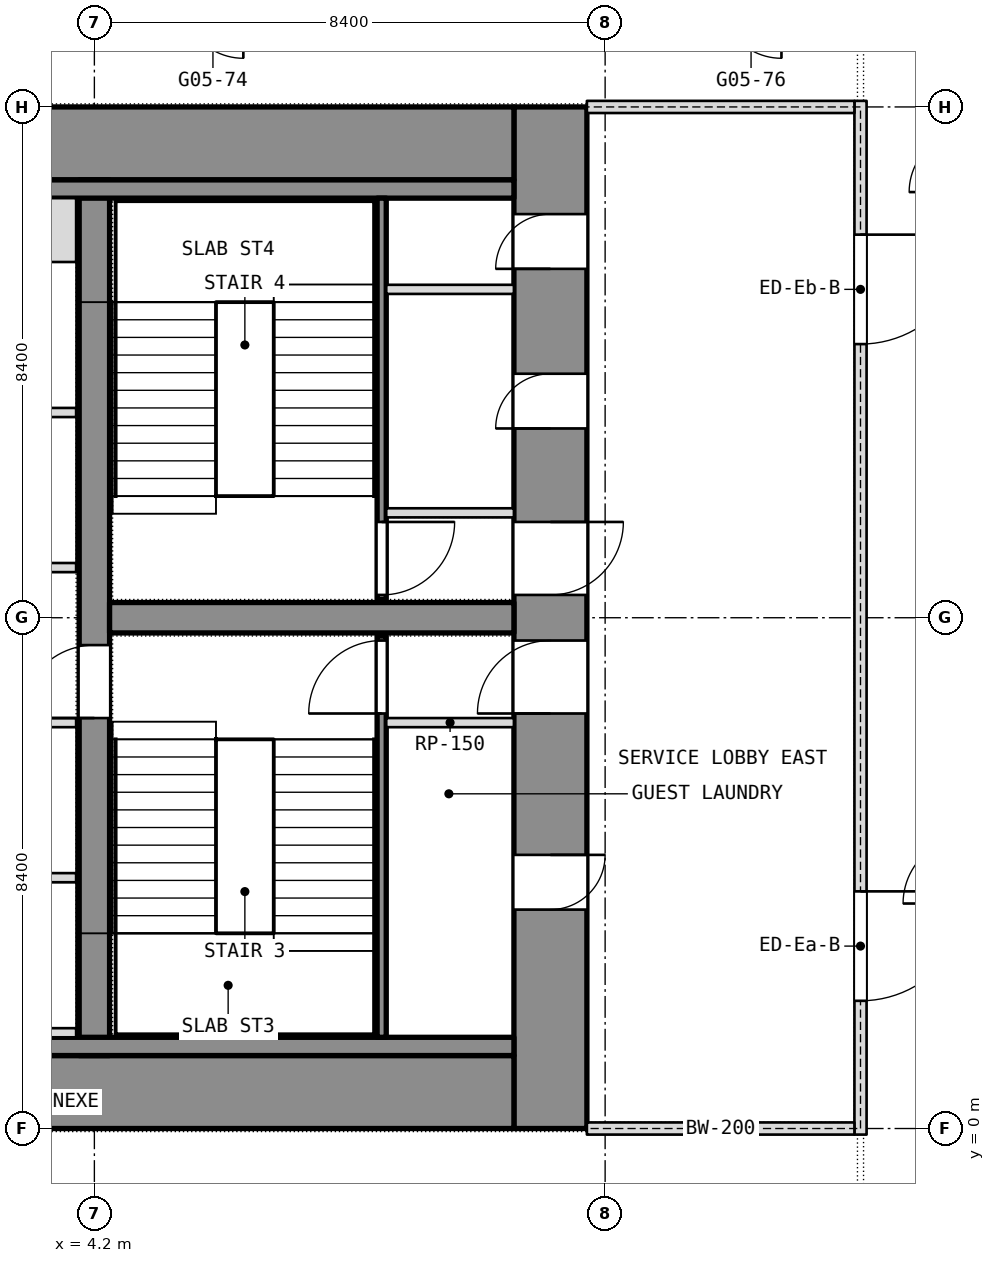
"""IFC4 building model, lengths in metres.
Left out: names, types, materials, properties, quantities, classifications, styles, units other than length and angle.
Written with IfcOpenShell. Run it as: python <this file> out.ifc"""

import sys

from ifc_helpers import new_model, si_unit, direction, frame, frame_2d, origin, place, context, subcontext, project, spatial, rectangle, extrude, element, fill, save


model = new_model("IFC4")
c1 = context("Model", 3, precision=1e-05, world=origin(), true_north=direction((0.0, 1.0)))
c2 = subcontext(c1, "Body", "Model", "MODEL_VIEW")
j1 = project(units=[si_unit("LENGTHUNIT", "METRE"), si_unit("PLANEANGLEUNIT", "RADIAN")], contexts=[c1])
p1 = place(None, origin())
s1 = spatial("IfcSite", under=j1, at=p1, CompositionType="ELEMENT")
p2 = place(p1, origin())
s2 = spatial("IfcBuilding", under=s1, at=p2, CompositionType="ELEMENT")
p3 = place(p2, frame((0.0, 0.0, 65.3)))
s3 = spatial("IfcBuildingStorey", under=s2, at=p3, CompositionType="ELEMENT", Elevation=65.3)
p4 = place(p3, frame((11.7, 0.0, 0.0), z_axis=(0.0, 0.0, 1.0), x_axis=(0.0, 1.0, 0.0)))
e1 = element("IfcWall", 1, at=p4, inside=s3, PredefinedType="SHEAR", context=c2, shape_type="SweptSolid", body=[
    extrude(rectangle(XDim=16.8, YDim=1.2, at=frame_2d((8.4, 0.0))), origin(), (0.0, 0.0, 1.0), 3.6),
])
p5 = place(p4, frame((3.6, 0.0, 0.0)))
e2 = element("IfcOpeningElement", 2, at=p5, cuts=e1, PredefinedType="OPENING", context=c2, shape_type="SweptSolid", body=[
    extrude(rectangle(XDim=0.9, YDim=2.1, at=frame_2d((0.45, 1.05))), frame((0.0, 0.6, 0.0), z_axis=(0.0, -1.0, 0.0), x_axis=(1.0, 0.0, 0.0)), (0.0, 0.0, 1.0), 1.2),
])
p6 = place(p4, frame((6.825, 0.0, 0.0)))
e3 = element("IfcOpeningElement", 3, at=p6, cuts=e1, PredefinedType="OPENING", context=c2, shape_type="SweptSolid", body=[
    extrude(rectangle(XDim=1.2, YDim=2.1, at=frame_2d((0.6, 1.05))), frame((0.0, 0.6, 0.0), z_axis=(0.0, -1.0, 0.0), x_axis=(1.0, 0.0, 0.0)), (0.0, 0.0, 1.0), 1.2),
])
p7 = place(p4, frame((14.137, 0.0, 0.0)))
e4 = element("IfcOpeningElement", 4, at=p7, cuts=e1, PredefinedType="OPENING", context=c2, shape_type="SweptSolid", body=[
    extrude(rectangle(XDim=0.9, YDim=2.1, at=frame_2d((0.45, 1.05))), frame((0.0, 0.6, 0.0), z_axis=(0.0, -1.0, 0.0), x_axis=(1.0, 0.0, 0.0)), (0.0, 0.0, 1.0), 1.2),
])
p8 = place(p4, frame((11.512, 0.0, 0.0)))
e5 = element("IfcOpeningElement", 5, at=p8, cuts=e1, PredefinedType="OPENING", context=c2, shape_type="SweptSolid", body=[
    extrude(rectangle(XDim=0.9, YDim=2.1, at=frame_2d((0.45, 1.05))), frame((0.0, 0.6, 0.0), z_axis=(0.0, -1.0, 0.0), x_axis=(1.0, 0.0, 0.0)), (0.0, 0.0, 1.0), 1.2),
])
p9 = place(p4, frame((8.775, 0.0, 0.0)))
e6 = element("IfcOpeningElement", 6, at=p9, cuts=e1, PredefinedType="OPENING", context=c2, shape_type="SweptSolid", body=[
    extrude(rectangle(XDim=1.2, YDim=2.1, at=frame_2d((0.6, 1.05))), frame((0.0, 0.6, 0.0), z_axis=(0.0, -1.0, 0.0), x_axis=(1.0, 0.0, 0.0)), (0.0, 0.0, 1.0), 1.2),
])
for number, where, z_axis, x_axis in (
    (7, (-11.1, 0.6, 0.0), (0.0, 0.0, 1.0), (1.0, 0.0, 0.0)),
    (8, (-11.1, 16.2, 0.0), (0.0, 0.0, 1.0), (1.0, 0.0, 0.0)),
):
    element("IfcWall", number, at=place(p3, frame(where, z_axis=z_axis, x_axis=x_axis)), inside=s3, PredefinedType="SHEAR", context=c2, shape_type="SweptSolid", body=[
        extrude(rectangle(XDim=22.2, YDim=1.2, at=frame_2d((11.1, 0.0))), origin(), (0.0, 0.0, 1.0), 3.6),
    ])
p10 = place(p3, frame((4.2, 1.2, 0.0), z_axis=(0.0, 0.0, 1.0), x_axis=(0.0, 1.0, 0.0)))
e9 = element("IfcWall", 9, at=p10, inside=s3, PredefinedType="SHEAR", context=c2, shape_type="SweptSolid", body=[
    extrude(rectangle(XDim=14.4, YDim=0.5, at=frame_2d((7.2, 0.0))), origin(), (0.0, 0.0, 1.0), 3.6),
])
p11 = place(p10, frame((5.55, 0.0, 0.0)))
e10 = element("IfcOpeningElement", 10, at=p11, cuts=e9, PredefinedType="OPENING", context=c2, shape_type="SweptSolid", body=[
    extrude(rectangle(XDim=1.2, YDim=2.1, at=frame_2d((0.6, 1.05))), frame((0.0, 0.25, 0.0), z_axis=(0.0, -1.0, 0.0), x_axis=(1.0, 0.0, 0.0)), (0.0, 0.0, 1.0), 0.5),
])
p12 = place(p3, frame((4.45, 8.4, 0.0), z_axis=(0.0, 0.0, 1.0), x_axis=(1.0, 0.0, 0.0)))
e11 = element("IfcWall", 11, at=p12, inside=s3, PredefinedType="SHEAR", context=c2, shape_type="SweptSolid", body=[
    extrude(rectangle(XDim=6.65, YDim=0.5, at=frame_2d((3.325, 0.0))), origin(), (0.0, 0.0, 1.0), 3.6),
])
for number, where, z_axis, x_axis in (
    (12, (-11.1, 1.35, 0.0), (0.0, 0.0, 1.0), (1.0, 0.0, 0.0)),
    (13, (-11.1, 15.45, 0.0), (0.0, 0.0, 1.0), (1.0, 0.0, 0.0)),
):
    element("IfcWall", number, at=place(p3, frame(where, z_axis=z_axis, x_axis=x_axis)), inside=s3, PredefinedType="PARTITIONING", context=c2, shape_type="SweptSolid", body=[
        extrude(rectangle(XDim=22.2, YDim=0.3, at=frame_2d((11.1, 0.0))), origin(), (0.0, 0.0, 1.0), 3.34),
    ])
p13 = place(p3, frame((8.925, 1.5, 0.0), z_axis=(0.0, 0.0, 1.0), x_axis=(0.0, 1.0, 0.0)))
e14 = element("IfcWall", 14, at=p13, inside=s3, PredefinedType="SHEAR", context=c2, shape_type="SweptSolid", body=[
    extrude(rectangle(XDim=6.6, YDim=0.15, at=frame_2d((3.3, 0.0))), origin(), (0.0, 0.0, 1.0), 3.34),
])
p14 = place(p13, frame((5.325, 0.0, 0.0)))
e15 = element("IfcOpeningElement", 15, at=p14, cuts=e14, PredefinedType="OPENING", context=c2, shape_type="SweptSolid", body=[
    extrude(rectangle(XDim=1.2, YDim=2.1, at=frame_2d((0.6, 1.05))), frame((0.0, 0.075, 0.0), z_axis=(0.0, -1.0, 0.0), x_axis=(1.0, 0.0, 0.0)), (0.0, 0.0, 1.0), 0.15),
])
p15 = place(p3, frame((9.0, 6.675, 0.0), z_axis=(0.0, 0.0, 1.0), x_axis=(1.0, 0.0, 0.0)))
e16 = element("IfcWall", 16, at=p15, inside=s3, PredefinedType="PARTITIONING", context=c2, shape_type="SweptSolid", body=[
    extrude(rectangle(XDim=2.1, YDim=0.15, at=frame_2d((1.05, 0.0))), origin(), (0.0, 0.0, 1.0), 3.34),
])
p16 = place(p3, frame((8.925, 8.7, 0.0), z_axis=(0.0, 0.0, 1.0), x_axis=(0.0, 1.0, 0.0)))
e17 = element("IfcWall", 17, at=p16, inside=s3, PredefinedType="SHEAR", context=c2, shape_type="SweptSolid", body=[
    extrude(rectangle(XDim=6.6, YDim=0.15, at=frame_2d((3.3, 0.0))), origin(), (0.0, 0.0, 1.0), 3.34),
])
p17 = place(p16, frame((0.075, 0.0, 0.0)))
e18 = element("IfcOpeningElement", 18, at=p17, cuts=e17, PredefinedType="OPENING", context=c2, shape_type="SweptSolid", body=[
    extrude(rectangle(XDim=1.2, YDim=2.1, at=frame_2d((0.6, 1.05))), frame((0.0, 0.075, 0.0), z_axis=(0.0, -1.0, 0.0), x_axis=(1.0, 0.0, 0.0)), (0.0, 0.0, 1.0), 0.15),
])
for number, where, z_axis, x_axis in (
    (19, (9.0, 10.125, 0.0), (0.0, 0.0, 1.0), (1.0, 0.0, 0.0)),
    (20, (9.0, 13.8, 0.0), (0.0, 0.0, 1.0), (1.0, 0.0, 0.0)),
):
    element("IfcWall", number, at=place(p3, frame(where, z_axis=z_axis, x_axis=x_axis)), inside=s3, PredefinedType="PARTITIONING", context=c2, shape_type="SweptSolid", body=[
        extrude(rectangle(XDim=2.1, YDim=0.15, at=frame_2d((1.05, 0.0))), origin(), (0.0, 0.0, 1.0), 3.34),
    ])
p18 = place(p3, frame((-3.9, 4.125, 0.0), z_axis=(0.0, 0.0, 1.0), x_axis=(1.0, 0.0, 0.0)))
e21 = element("IfcWall", 21, at=p18, inside=s3, PredefinedType="PARTITIONING", context=c2, shape_type="SweptSolid", body=[
    extrude(rectangle(XDim=7.8, YDim=0.15, at=frame_2d((3.9, 0.0))), origin(), (0.0, 0.0, 1.0), 3.34),
])
p19 = place(p18, frame((3.75, 0.0, 0.0)))
e22 = element("IfcOpeningElement", 22, at=p19, cuts=e21, PredefinedType="OPENING", context=c2, shape_type="SweptSolid", body=[
    extrude(rectangle(XDim=1.2, YDim=2.1, at=frame_2d((0.6, 1.05))), frame((0.0, 0.075, 0.0), z_axis=(0.0, -1.0, 0.0), x_axis=(1.0, 0.0, 0.0)), (0.0, 0.0, 1.0), 0.15),
])
p20 = place(p3, frame((-3.9, 11.775, 0.0), z_axis=(0.0, 0.0, 1.0), x_axis=(1.0, 0.0, 0.0)))
e23 = element("IfcWall", 23, at=p20, inside=s3, PredefinedType="PARTITIONING", context=c2, shape_type="SweptSolid", body=[
    extrude(rectangle(XDim=7.8, YDim=0.15, at=frame_2d((3.9, 0.0))), origin(), (0.0, 0.0, 1.0), 3.34),
])
p21 = place(p20, frame((3.3, 0.0, 0.0)))
e24 = element("IfcOpeningElement", 24, at=p21, cuts=e23, PredefinedType="OPENING", context=c2, shape_type="SweptSolid", body=[
    extrude(rectangle(XDim=1.2, YDim=2.1, at=frame_2d((0.6, 1.05))), frame((0.0, 0.075, 0.0), z_axis=(0.0, -1.0, 0.0), x_axis=(1.0, 0.0, 0.0)), (0.0, 0.0, 1.0), 0.15),
])
p22 = place(p3, frame((1.65, 1.575, 0.0), z_axis=(0.0, 0.0, 1.0), x_axis=(1.0, 0.0, 0.0)))
e25 = element("IfcWall", 25, at=p22, inside=s3, PredefinedType="SHEAR", context=c2, shape_type="SweptSolid", body=[
    extrude(rectangle(XDim=2.25, YDim=0.15, at=frame_2d((1.125, 0.0))), origin(), (0.0, 0.0, 1.0), 3.6),
])
p23 = place(p3, frame((1.65, 14.775, 0.0), z_axis=(0.0, 0.0, 1.0), x_axis=(1.0, 0.0, 0.0)))
e26 = element("IfcWall", 26, at=p23, inside=s3, PredefinedType="SHEAR", context=c2, shape_type="SweptSolid", body=[
    extrude(rectangle(XDim=2.25, YDim=1.05, at=frame_2d((1.125, 0.0))), origin(), (0.0, 0.0, 1.0), 3.6),
])
for number, where, z_axis, x_axis in (
    (27, (1.65, 6.675, 0.0), (0.0, 0.0, 1.0), (1.0, 0.0, 0.0)),
    (28, (1.65, 9.225, 0.0), (0.0, 0.0, 1.0), (1.0, 0.0, 0.0)),
):
    element("IfcWall", number, at=place(p3, frame(where, z_axis=z_axis, x_axis=x_axis)), inside=s3, PredefinedType="SHEAR", context=c2, shape_type="SweptSolid", body=[
        extrude(rectangle(XDim=2.25, YDim=0.15, at=frame_2d((1.125, 0.0))), origin(), (0.0, 0.0, 1.0), 3.6),
    ])
p24 = place(p3, frame((16.8, -0.1, 0.0), z_axis=(0.0, 0.0, 1.0), x_axis=(0.0, 1.0, 0.0)))
e29 = element("IfcWall", 29, at=p24, inside=s3, PredefinedType="PARTITIONING", context=c2, shape_type="SweptSolid", body=[
    extrude(rectangle(XDim=17.0, YDim=0.2, at=frame_2d((8.5, 0.0))), origin(), (0.0, 0.0, 1.0), 3.34),
])
p25 = place(p24, frame((2.2, 0.0, 0.0)))
e30 = element("IfcOpeningElement", 30, at=p25, cuts=e29, PredefinedType="OPENING", context=c2, shape_type="SweptSolid", body=[
    extrude(rectangle(XDim=1.8, YDim=2.1, at=frame_2d((0.9, 1.05))), frame((0.0, 0.1, 0.0), z_axis=(0.0, -1.0, 0.0), x_axis=(1.0, 0.0, 0.0)), (0.0, 0.0, 1.0), 0.2),
])
p26 = place(p24, frame((13.0, 0.0, 0.0)))
e31 = element("IfcOpeningElement", 31, at=p26, cuts=e29, PredefinedType="OPENING", context=c2, shape_type="SweptSolid", body=[
    extrude(rectangle(XDim=1.8, YDim=2.1, at=frame_2d((0.9, 1.05))), frame((0.0, 0.1, 0.0), z_axis=(0.0, -1.0, 0.0), x_axis=(1.0, 0.0, 0.0)), (0.0, 0.0, 1.0), 0.2),
])
for number, where, z_axis, x_axis in (
    (32, (12.3, 0.0, 0.0), (0.0, 0.0, 1.0), (1.0, 0.0, 0.0)),
    (33, (12.3, 16.8, 0.0), (0.0, 0.0, 1.0), (1.0, 0.0, 0.0)),
):
    element("IfcWall", number, at=place(p3, frame(where, z_axis=z_axis, x_axis=x_axis)), inside=s3, PredefinedType="PARTITIONING", context=c2, shape_type="SweptSolid", body=[
        extrude(rectangle(XDim=4.4, YDim=0.2, at=frame_2d((2.2, 0.0))), origin(), (0.0, 0.0, 1.0), 2.84),
    ])
p27 = place(p5, origin())
e34 = element("IfcDoor", 34, at=p27, inside=s3, OperationType="SINGLE_SWING_LEFT", PredefinedType="DOOR", context=c2, shape_type="SweptSolid", body=[
    extrude(rectangle(XDim=0.9, YDim=2.1, at=frame_2d((0.45, 1.05))), frame((0.0, 0.025, 0.0), z_axis=(0.0, -1.0, 0.0), x_axis=(1.0, 0.0, 0.0)), (0.0, 0.0, 1.0), 0.05),
])
fill(e2, e34)
p28 = place(p6, origin())
e35 = element("IfcDoor", 35, at=p28, inside=s3, OperationType="SINGLE_SWING_LEFT", PredefinedType="DOOR", context=c2, shape_type="SweptSolid", body=[
    extrude(rectangle(XDim=1.2, YDim=2.1, at=frame_2d((0.6, 1.05))), frame((0.0, 0.025, 0.0), z_axis=(0.0, -1.0, 0.0), x_axis=(1.0, 0.0, 0.0)), (0.0, 0.0, 1.0), 0.05),
])
fill(e3, e35)
p29 = place(p14, origin())
e36 = element("IfcDoor", 36, at=p29, inside=s3, OperationType="SINGLE_SWING_LEFT", PredefinedType="DOOR", context=c2, shape_type="SweptSolid", body=[
    extrude(rectangle(XDim=1.2, YDim=2.1, at=frame_2d((0.6, 1.05))), frame((0.0, 0.025, 0.0), z_axis=(0.0, -1.0, 0.0), x_axis=(1.0, 0.0, 0.0)), (0.0, 0.0, 1.0), 0.05),
])
fill(e15, e36)
p30 = place(p7, origin())
e37 = element("IfcDoor", 37, at=p30, inside=s3, OperationType="SINGLE_SWING_LEFT", PredefinedType="DOOR", context=c2, shape_type="SweptSolid", body=[
    extrude(rectangle(XDim=0.9, YDim=2.1, at=frame_2d((0.45, 1.05))), frame((0.0, 0.025, 0.0), z_axis=(0.0, -1.0, 0.0), x_axis=(1.0, 0.0, 0.0)), (0.0, 0.0, 1.0), 0.05),
])
fill(e4, e37)
p31 = place(p8, origin())
e38 = element("IfcDoor", 38, at=p31, inside=s3, OperationType="SINGLE_SWING_LEFT", PredefinedType="DOOR", context=c2, shape_type="SweptSolid", body=[
    extrude(rectangle(XDim=0.9, YDim=2.1, at=frame_2d((0.45, 1.05))), frame((0.0, 0.025, 0.0), z_axis=(0.0, -1.0, 0.0), x_axis=(1.0, 0.0, 0.0)), (0.0, 0.0, 1.0), 0.05),
])
fill(e5, e38)
p32 = place(p9, origin())
e39 = element("IfcDoor", 39, at=p32, inside=s3, OperationType="SINGLE_SWING_LEFT", PredefinedType="DOOR", context=c2, shape_type="SweptSolid", body=[
    extrude(rectangle(XDim=1.2, YDim=2.1, at=frame_2d((0.6, 1.05))), frame((0.0, 0.025, 0.0), z_axis=(0.0, -1.0, 0.0), x_axis=(1.0, 0.0, 0.0)), (0.0, 0.0, 1.0), 0.05),
])
fill(e6, e39)
p33 = place(p17, origin())
e40 = element("IfcDoor", 40, at=p33, inside=s3, OperationType="SINGLE_SWING_LEFT", PredefinedType="DOOR", context=c2, shape_type="SweptSolid", body=[
    extrude(rectangle(XDim=1.2, YDim=2.1, at=frame_2d((0.6, 1.05))), frame((0.0, 0.025, 0.0), z_axis=(0.0, -1.0, 0.0), x_axis=(1.0, 0.0, 0.0)), (0.0, 0.0, 1.0), 0.05),
])
fill(e18, e40)
p34 = place(p11, origin())
e41 = element("IfcDoor", 41, at=p34, inside=s3, OperationType="SINGLE_SWING_LEFT", PredefinedType="DOOR", context=c2, shape_type="SweptSolid", body=[
    extrude(rectangle(XDim=1.2, YDim=2.1, at=frame_2d((0.6, 1.05))), frame((0.0, 0.025, 0.0), z_axis=(0.0, -1.0, 0.0), x_axis=(1.0, 0.0, 0.0)), (0.0, 0.0, 1.0), 0.05),
])
fill(e10, e41)
p35 = place(p25, origin())
e42 = element("IfcDoor", 42, at=p35, inside=s3, OperationType="DOUBLE_DOOR_SINGLE_SWING", PredefinedType="DOOR", context=c2, shape_type="SweptSolid", body=[
    extrude(rectangle(XDim=1.8, YDim=2.1, at=frame_2d((0.9, 1.05))), frame((0.0, 0.025, 0.0), z_axis=(0.0, -1.0, 0.0), x_axis=(1.0, 0.0, 0.0)), (0.0, 0.0, 1.0), 0.05),
])
fill(e30, e42)
p36 = place(p26, origin())
e43 = element("IfcDoor", 43, at=p36, inside=s3, OperationType="DOUBLE_DOOR_SINGLE_SWING", PredefinedType="DOOR", context=c2, shape_type="SweptSolid", body=[
    extrude(rectangle(XDim=1.8, YDim=2.1, at=frame_2d((0.9, 1.05))), frame((0.0, 0.025, 0.0), z_axis=(0.0, -1.0, 0.0), x_axis=(1.0, 0.0, 0.0)), (0.0, 0.0, 1.0), 0.05),
])
fill(e31, e43)
save(model, sys.argv[1])
